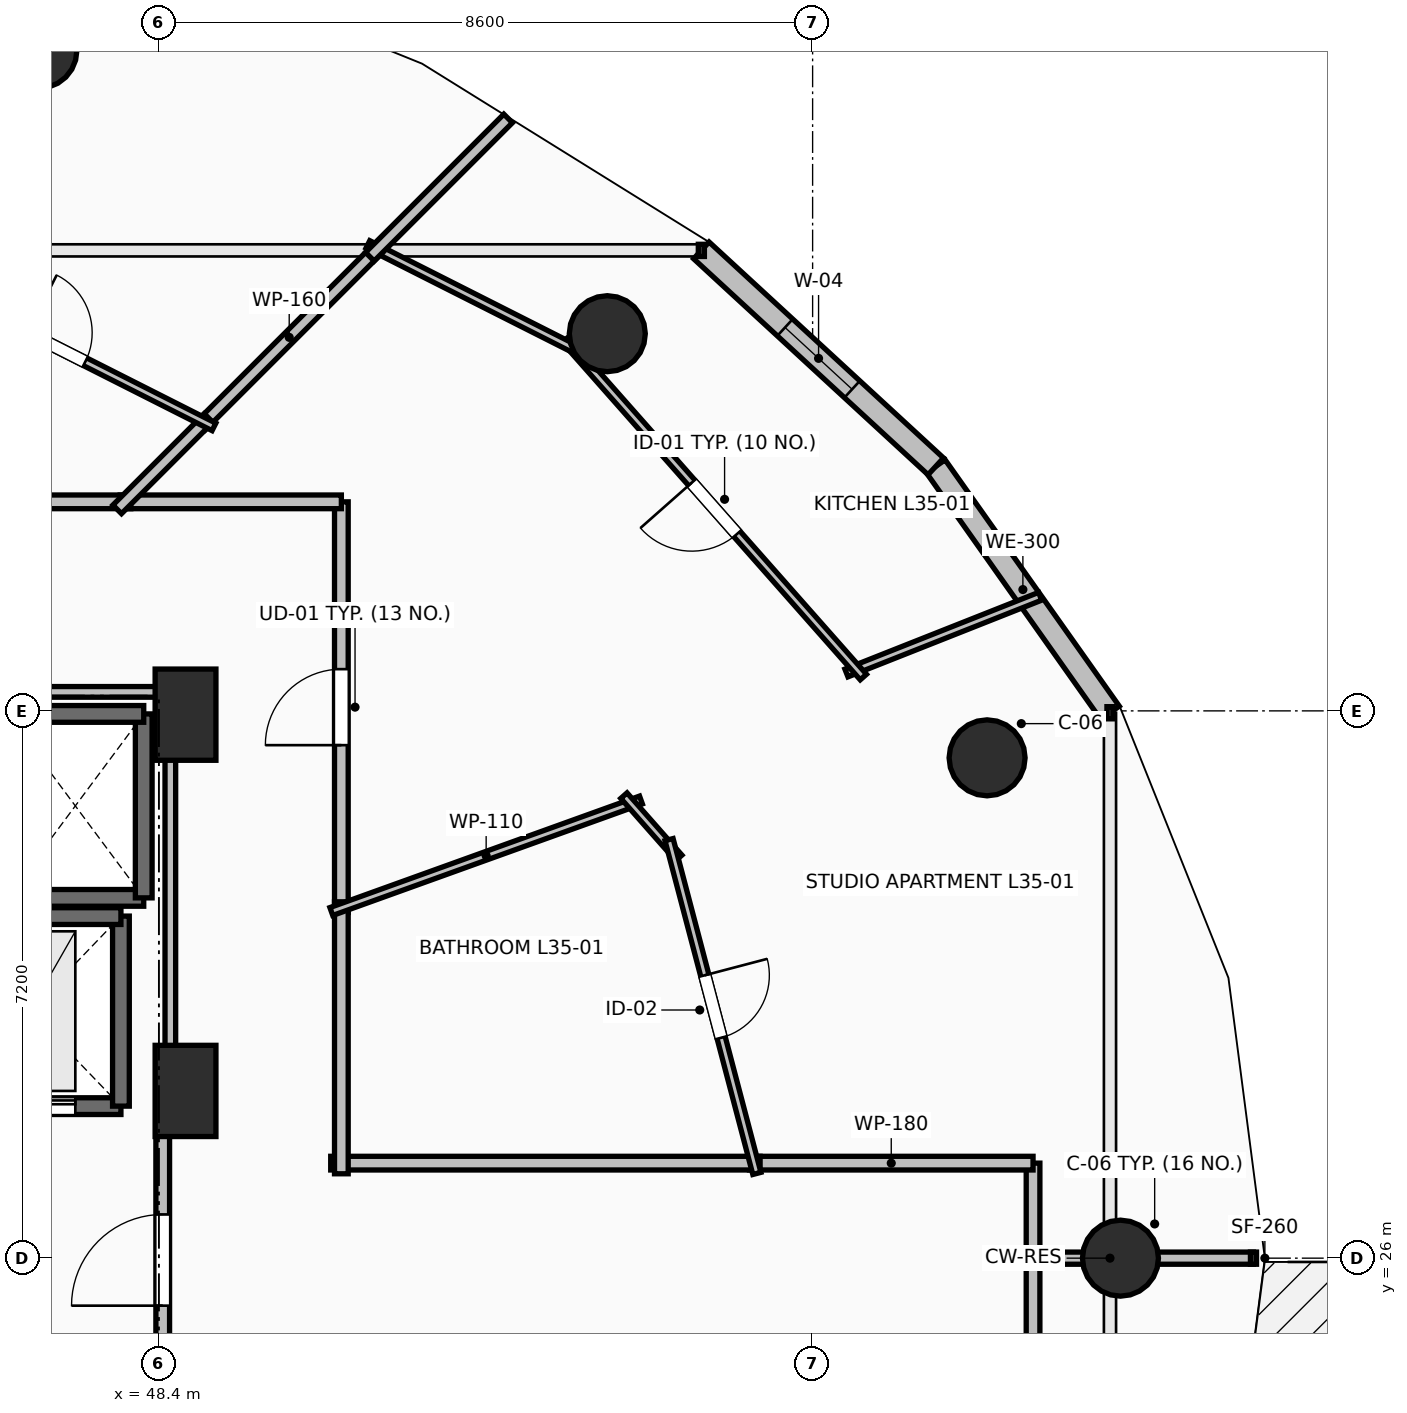
"""IFC4 building model, lengths in metres.
Left out: names, types, materials, properties, quantities, classifications, styles, units other than length and angle.
Written with IfcOpenShell. Run it as: python <this file> out.ifc"""

import sys

from ifc_helpers import new_model, si_unit, direction, frame, frame_2d, origin, origin_2d, place, context, subcontext, project, spatial, rectangle, circle, extrude, element, fill, save


model = new_model("IFC4")
c1 = context("Model", 3, precision=1e-05, world=origin(), true_north=direction((0.0, 1.0)))
c2 = subcontext(c1, "Body", "Model", "MODEL_VIEW")
j1 = project(units=[si_unit("LENGTHUNIT", "METRE"), si_unit("PLANEANGLEUNIT", "RADIAN")], contexts=[c1])
p1 = place(None, origin())
s1 = spatial("IfcSite", under=j1, at=p1, CompositionType="ELEMENT")
p2 = place(p1, origin())
s2 = spatial("IfcBuilding", under=s1, at=p2, CompositionType="ELEMENT")
p3 = place(p2, frame((0.0, 0.0, 132.6)))
s3 = spatial("IfcBuildingStorey", under=s2, at=p3, CompositionType="ELEMENT", Elevation=132.6)
for number, where, z_axis, x_axis in (
    (1, (61.05, 26.0, 0.0), (0.0, 0.0, 1.0), (1.0, 0.0, 0.0)),
    (2, (59.295, 32.582, 0.0), (0.0, 0.0, 1.0), (0.924, 0.383, 0.0)),
    (3, (54.299, 38.162, 0.0), (0.0, 0.0, 1.0), (0.707, 0.707, 0.0)),
    (4, (46.821, 41.891, 0.0), (0.0, 0.0, 1.0), (0.383, 0.924, 0.0)),
):
    element("IfcColumn", number, at=place(p3, frame(where, z_axis=z_axis, x_axis=x_axis)), inside=s3, PredefinedType="COLUMN", context=c2, shape_type="SweptSolid", body=[
        extrude(circle(Radius=0.5, at=origin_2d()), origin(), (0.0, 0.0, 1.0), 3.5),
    ])
for number, where, z_axis, x_axis in (
    (5, (48.75, 33.15, 0.0), (0.0, 0.0, 1.0), (1.0, 0.0, 0.0)),
    (6, (48.75, 28.2, 0.0), (0.0, 0.0, 1.0), (1.0, 0.0, 0.0)),
):
    element("IfcColumn", number, at=place(p3, frame(where, z_axis=z_axis, x_axis=x_axis)), inside=s3, PredefinedType="PILASTER", context=c2, shape_type="SweptSolid", body=[
        extrude(rectangle(XDim=0.8, YDim=1.2, at=origin_2d()), origin(), (0.0, 0.0, 1.0), 3.5),
    ])
p4 = place(p3, frame((60.912, 33.175, 0.0), z_axis=(0.0, 0.0, 1.0), x_axis=(-0.577269753207, 0.816553508371, 0.0)))
e7 = element("IfcWall", 7, at=p4, inside=s3, PredefinedType="STANDARD", context=c2, shape_type="SweptSolid", body=[
    extrude(rectangle(XDim=3.97, YDim=0.3, at=frame_2d((1.985, 0.0))), origin(), (0.0, 0.0, 1.0), 3.24),
])
p5 = place(p3, frame((58.62, 36.417, 0.0), z_axis=(0.0, 0.0, 1.0), x_axis=(-0.735477154165, 0.677549522693, 0.0)))
e8 = element("IfcWall", 8, at=p5, inside=s3, PredefinedType="STANDARD", context=c2, shape_type="SweptSolid", body=[
    extrude(rectangle(XDim=4.194, YDim=0.3, at=frame_2d((2.097, 0.0))), origin(), (0.0, 0.0, 1.0), 3.24),
])
p6 = place(p5, frame((1.497, 0.0, 0.85)))
e9 = element("IfcOpeningElement", 9, at=p6, cuts=e8, PredefinedType="OPENING", context=c2, shape_type="SweptSolid", body=[
    extrude(rectangle(XDim=1.2, YDim=2.1, at=frame_2d((0.6, 1.05))), frame((0.0, 0.165, 0.0), z_axis=(0.0, -1.0, 0.0), x_axis=(1.0, 0.0, 0.0)), (0.0, 0.0, 1.0), 0.33),
])
p7 = place(p3, frame((46.4, 30.74, 0.0), z_axis=(0.0, 0.0, 1.0), x_axis=(1.0, 0.0, 0.0)))
e10 = element("IfcWall", 10, at=p7, inside=s3, PredefinedType="SOLIDWALL", context=c2, shape_type="SweptSolid", body=[
    extrude(rectangle(XDim=1.8, YDim=0.22, at=frame_2d((0.9, 0.0))), origin(), (0.0, 0.0, 1.0), 3.24),
])
p8 = place(p3, frame((48.2, 30.74, 0.0), z_axis=(0.0, 0.0, 1.0), x_axis=(0.0, 1.0, 0.0)))
e11 = element("IfcWall", 11, at=p8, inside=s3, PredefinedType="SOLIDWALL", context=c2, shape_type="SweptSolid", body=[
    extrude(rectangle(XDim=2.42, YDim=0.22, at=frame_2d((1.21, 0.0))), origin(), (0.0, 0.0, 1.0), 3.24),
])
p9 = place(p3, frame((48.2, 33.16, 0.0), z_axis=(0.0, 0.0, 1.0), x_axis=(-1.0, 0.0, 0.0)))
e12 = element("IfcWall", 12, at=p9, inside=s3, PredefinedType="SOLIDWALL", context=c2, shape_type="SweptSolid", body=[
    extrude(rectangle(XDim=1.8, YDim=0.22, at=frame_2d((0.9, 0.0))), origin(), (0.0, 0.0, 1.0), 3.24),
])
p10 = place(p3, frame((45.5, 28.0, 0.0), z_axis=(0.0, 0.0, 1.0), x_axis=(1.0, 0.0, 0.0)))
e13 = element("IfcWall", 13, at=p10, inside=s3, PredefinedType="SHEAR", context=c2, shape_type="SweptSolid", body=[
    extrude(rectangle(XDim=2.4, YDim=0.22, at=frame_2d((1.2, 0.0))), origin(), (0.0, 0.0, 1.0), 3.24),
])
p11 = place(p10, frame((0.6, 0.0, 0.0)))
e14 = element("IfcOpeningElement", 14, at=p11, cuts=e13, PredefinedType="OPENING", context=c2, shape_type="SweptSolid", body=[
    extrude(rectangle(XDim=1.2, YDim=2.2, at=frame_2d((0.6, 1.1))), frame((0.0, 0.125, 0.0), z_axis=(0.0, -1.0, 0.0), x_axis=(1.0, 0.0, 0.0)), (0.0, 0.0, 1.0), 0.25),
])
p12 = place(p3, frame((47.9, 28.0, 0.0), z_axis=(0.0, 0.0, 1.0), x_axis=(0.0, 1.0, 0.0)))
e15 = element("IfcWall", 15, at=p12, inside=s3, PredefinedType="SHEAR", context=c2, shape_type="SweptSolid", body=[
    extrude(rectangle(XDim=2.5, YDim=0.22, at=frame_2d((1.25, 0.0))), origin(), (0.0, 0.0, 1.0), 3.24),
])
p13 = place(p3, frame((47.9, 30.5, 0.0), z_axis=(0.0, 0.0, 1.0), x_axis=(-1.0, 0.0, 0.0)))
e16 = element("IfcWall", 16, at=p13, inside=s3, PredefinedType="SHEAR", context=c2, shape_type="SweptSolid", body=[
    extrude(rectangle(XDim=2.4, YDim=0.22, at=frame_2d((1.2, 0.0))), origin(), (0.0, 0.0, 1.0), 3.24),
])
p14 = place(p3, frame((48.45, 23.95, 0.0), z_axis=(0.0, 0.0, 1.0), x_axis=(0.0, 1.0, 0.0)))
e17 = element("IfcWall", 17, at=p14, inside=s3, PredefinedType="PARTITIONING", context=c2, shape_type="SweptSolid", body=[
    extrude(rectangle(XDim=4.05, YDim=0.18, at=frame_2d((2.025, 0.0))), origin(), (0.0, 0.0, 1.0), 3.24),
])
p15 = place(p14, frame((1.425, 0.0, 0.0)))
e18 = element("IfcOpeningElement", 18, at=p15, cuts=e17, PredefinedType="OPENING", context=c2, shape_type="SweptSolid", body=[
    extrude(rectangle(XDim=1.2, YDim=2.15, at=frame_2d((0.6, 1.075))), frame((0.0, 0.105, 0.0), z_axis=(0.0, -1.0, 0.0), x_axis=(1.0, 0.0, 0.0)), (0.0, 0.0, 1.0), 0.21),
])
p16 = place(p3, frame((59.9, 25.94, 0.0), z_axis=(0.0, 0.0, 1.0), x_axis=(0.0, 1.0, 0.0)))
e19 = element("IfcWall", 19, at=p16, inside=s3, PredefinedType="PARTITIONING", context=c2, shape_type="SweptSolid", body=[
    extrude(rectangle(XDim=1.31, YDim=0.18, at=frame_2d((0.655, 0.0))), origin(), (0.0, 0.0, 1.0), 2.432),
])
p17 = place(p3, frame((59.9, 27.25, 0.0), z_axis=(0.0, 0.0, 1.0), x_axis=(-1.0, 0.0, 0.0)))
e20 = element("IfcWall", 20, at=p17, inside=s3, PredefinedType="PARTITIONING", context=c2, shape_type="SweptSolid", body=[
    extrude(rectangle(XDim=3.731, YDim=0.18, at=frame_2d((1.865, 0.0))), origin(), (0.0, 0.0, 1.0), 2.874),
])
p18 = place(p3, frame((50.8, 30.548, 0.0), z_axis=(0.0, 0.0, 1.0), x_axis=(0.0, 1.0, 0.0)))
e21 = element("IfcWall", 21, at=p18, inside=s3, PredefinedType="PARTITIONING", context=c2, shape_type="SweptSolid", body=[
    extrude(rectangle(XDim=5.402, YDim=0.18, at=frame_2d((2.701, 0.0))), origin(), (0.0, 0.0, 1.0), 2.432),
])
p19 = place(p18, frame((2.201, 0.0, 0.0)))
e22 = element("IfcOpeningElement", 22, at=p19, cuts=e21, PredefinedType="OPENING", context=c2, shape_type="SweptSolid", body=[
    extrude(rectangle(XDim=1.0, YDim=2.15, at=frame_2d((0.5, 1.075))), frame((0.0, 0.105, 0.0), z_axis=(0.0, -1.0, 0.0), x_axis=(1.0, 0.0, 0.0)), (0.0, 0.0, 1.0), 0.21),
])
p20 = place(p3, frame((50.8, 35.95, 0.0), z_axis=(0.0, 0.0, 1.0), x_axis=(-1.0, 0.0, 0.0)))
e23 = element("IfcWall", 23, at=p20, inside=s3, PredefinedType="PARTITIONING", context=c2, shape_type="SweptSolid", body=[
    extrude(rectangle(XDim=2.91, YDim=0.18, at=frame_2d((1.455, 0.0))), origin(), (0.0, 0.0, 1.0), 2.432),
])
p21 = place(p3, frame((56.309, 27.25, 0.0), z_axis=(0.0, 0.0, 1.0), x_axis=(-1.0, 0.0, 0.0)))
e24 = element("IfcWall", 24, at=p21, inside=s3, PredefinedType="PARTITIONING", context=c2, shape_type="SweptSolid", body=[
    extrude(rectangle(XDim=5.649, YDim=0.18, at=frame_2d((2.825, 0.0))), origin(), (0.0, 0.0, 1.0), 2.432),
])
p22 = place(p3, frame((50.8, 27.11, 0.0), z_axis=(0.0, 0.0, 1.0), x_axis=(0.0, 1.0, 0.0)))
e25 = element("IfcWall", 25, at=p22, inside=s3, PredefinedType="PARTITIONING", context=c2, shape_type="SweptSolid", body=[
    extrude(rectangle(XDim=3.578, YDim=0.18, at=frame_2d((1.789, 0.0))), origin(), (0.0, 0.0, 1.0), 2.432),
])
p23 = place(p3, frame((48.03, 35.95, 0.0), z_axis=(0.0, 0.0, 1.0), x_axis=(-1.0, 0.0, 0.0)))
e26 = element("IfcWall", 26, at=p23, inside=s3, PredefinedType="PARTITIONING", context=c2, shape_type="SweptSolid", body=[
    extrude(rectangle(XDim=5.422, YDim=0.18, at=frame_2d((2.711, 0.0))), origin(), (0.0, 0.0, 1.0), 2.432),
])
p24 = place(p3, frame((59.9, 24.55, 0.0), z_axis=(0.0, 0.0, 1.0), x_axis=(0.0, 1.0, 0.0)))
e27 = element("IfcWall", 27, at=p24, inside=s3, PredefinedType="PARTITIONING", context=c2, shape_type="SweptSolid", body=[
    extrude(rectangle(XDim=1.39, YDim=0.18, at=frame_2d((0.695, 0.0))), origin(), (0.0, 0.0, 1.0), 2.432),
])
p25 = place(p3, frame((50.668, 30.561, 0.0), z_axis=(0.0, 0.0, 1.0), x_axis=(0.94086224956, 0.33878935543, 0.0)))
e28 = element("IfcWall", 28, at=p25, inside=s3, PredefinedType="PARTITIONING", context=c2, shape_type="SweptSolid", body=[
    extrude(rectangle(XDim=4.33, YDim=0.11, at=frame_2d((2.165, 0.0))), origin(), (0.0, 0.0, 1.0), 2.922),
])
p26 = place(p3, frame((54.517, 32.085, 0.0), z_axis=(0.0, 0.0, 1.0), x_axis=(0.661444121134, -0.749994449724, 0.0)))
e29 = element("IfcWall", 29, at=p26, inside=s3, PredefinedType="PARTITIONING", context=c2, shape_type="SweptSolid", body=[
    extrude(rectangle(XDim=1.092, YDim=0.11, at=frame_2d((0.546, 0.0))), origin(), (0.0, 0.0, 1.0), 3.24),
])
p27 = place(p3, frame((55.111, 31.506, 0.0), z_axis=(0.0, 0.0, 1.0), x_axis=(0.254395386743, -0.96710029842, 0.0)))
e30 = element("IfcWall", 30, at=p27, inside=s3, PredefinedType="PARTITIONING", context=c2, shape_type="SweptSolid", body=[
    extrude(rectangle(XDim=4.541, YDim=0.11, at=frame_2d((2.271, 0.0))), origin(), (0.0, 0.0, 1.0), 2.432),
])
p28 = place(p27, frame((1.846, 0.0, 0.0)))
e31 = element("IfcOpeningElement", 31, at=p28, cuts=e30, PredefinedType="OPENING", context=c2, shape_type="SweptSolid", body=[
    extrude(rectangle(XDim=0.85, YDim=2.1, at=frame_2d((0.425, 1.05))), frame((0.0, 0.07, 0.0), z_axis=(0.0, -1.0, 0.0), x_axis=(1.0, 0.0, 0.0)), (0.0, 0.0, 1.0), 0.14),
])
p29 = place(p3, frame((59.993, 34.708, 0.0), z_axis=(0.0, 0.0, 1.0), x_axis=(-0.92976723416, -0.368147919025, 0.0)))
e32 = element("IfcWall", 32, at=p29, inside=s3, PredefinedType="PARTITIONING", context=c2, shape_type="SweptSolid", body=[
    extrude(rectangle(XDim=2.741, YDim=0.11, at=frame_2d((1.37, 0.0))), origin(), (0.0, 0.0, 1.0), 2.728),
])
p30 = place(p3, frame((57.668, 33.645, 0.0), z_axis=(0.0, 0.0, 1.0), x_axis=(-0.66214504072, 0.749375703536, 0.0)))
e33 = element("IfcWall", 33, at=p30, inside=s3, PredefinedType="PARTITIONING", context=c2, shape_type="SweptSolid", body=[
    extrude(rectangle(XDim=5.922, YDim=0.11, at=frame_2d((2.961, 0.0))), origin(), (0.0, 0.0, 1.0), 2.432),
])
p31 = place(p30, frame((2.511, 0.0, 0.0)))
e34 = element("IfcOpeningElement", 34, at=p31, cuts=e33, PredefinedType="OPENING", context=c2, shape_type="SweptSolid", body=[
    extrude(rectangle(XDim=0.9, YDim=2.1, at=frame_2d((0.45, 1.05))), frame((0.0, 0.07, 0.0), z_axis=(0.0, -1.0, 0.0), x_axis=(1.0, 0.0, 0.0)), (0.0, 0.0, 1.0), 0.14),
])
p32 = place(p3, frame((53.964, 37.915, 0.0), z_axis=(0.0, 0.0, 1.0), x_axis=(-0.892546166909, 0.450956028828, 0.0)))
e35 = element("IfcWall", 35, at=p32, inside=s3, PredefinedType="PARTITIONING", context=c2, shape_type="SweptSolid", body=[
    extrude(rectangle(XDim=3.154, YDim=0.11, at=frame_2d((1.577, 0.0))), origin(), (0.0, 0.0, 1.0), 2.432),
])
p33 = place(p3, frame((51.274, 39.274, 0.0), z_axis=(0.0, 0.0, 1.0), x_axis=(-0.707106781187, -0.707106781187, 0.0)))
e36 = element("IfcWall", 36, at=p33, inside=s3, PredefinedType="PARTITIONING", context=c2, shape_type="SweptSolid", body=[
    extrude(rectangle(XDim=3.281, YDim=0.16, at=frame_2d((1.64, 0.0))), origin(), (0.0, 0.0, 1.0), 2.874),
])
p34 = place(p3, frame((49.053, 37.053, 0.0), z_axis=(0.0, 0.0, 1.0), x_axis=(-0.707106781187, -0.707106781187, 0.0)))
e37 = element("IfcWall", 37, at=p34, inside=s3, PredefinedType="PARTITIONING", context=c2, shape_type="SweptSolid", body=[
    extrude(rectangle(XDim=1.7, YDim=0.16, at=frame_2d((0.85, 0.0))), origin(), (0.0, 0.0, 1.0), 2.432),
])
p35 = place(p3, frame((59.9, 26.0, 0.0), z_axis=(0.0, 0.0, 1.0), x_axis=(1.0, 0.0, 0.0)))
e38 = element("IfcWall", 38, at=p35, inside=s3, PredefinedType="PARTITIONING", context=c2, shape_type="SweptSolid", body=[
    extrude(rectangle(XDim=2.899, YDim=0.16, at=frame_2d((1.45, 0.0))), origin(), (0.0, 0.0, 1.0), 2.432),
])
p36 = place(p3, frame((52.994, 40.994, 0.0), z_axis=(0.0, 0.0, 1.0), x_axis=(-0.707106781187, -0.707106781187, 0.0)))
e39 = element("IfcWall", 39, at=p36, inside=s3, PredefinedType="PARTITIONING", context=c2, shape_type="SweptSolid", body=[
    extrude(rectangle(XDim=2.572, YDim=0.16, at=frame_2d((1.286, 0.0))), origin(), (0.0, 0.0, 1.0), 2.728),
])
p37 = place(p3, frame((44.978, 39.031, 0.0), z_axis=(0.0, 0.0, 1.0), x_axis=(0.892495276856, -0.451056737882, 0.0)))
e40 = element("IfcWall", 40, at=p37, inside=s3, PredefinedType="PARTITIONING", context=c2, shape_type="SweptSolid", body=[
    extrude(rectangle(XDim=4.645, YDim=0.11, at=frame_2d((2.323, 0.0))), origin(), (0.0, 0.0, 1.0), 2.432),
])
p38 = place(p37, frame((1.898, 0.0, 0.0)))
e41 = element("IfcOpeningElement", 41, at=p38, cuts=e40, PredefinedType="OPENING", context=c2, shape_type="SweptSolid", body=[
    extrude(rectangle(XDim=0.85, YDim=2.1, at=frame_2d((0.425, 1.05))), frame((0.0, 0.07, 0.0), z_axis=(0.0, -1.0, 0.0), x_axis=(1.0, 0.0, 0.0)), (0.0, 0.0, 1.0), 0.14),
])
p39 = place(p3, frame((48.55, 28.196, 0.0), z_axis=(0.0, 0.0, 1.0), x_axis=(0.0, 1.0, 0.0)))
e42 = element("IfcWall", 42, at=p39, inside=s3, PredefinedType="PARTITIONING", context=c2, shape_type="SweptSolid", body=[
    extrude(rectangle(XDim=5.254, YDim=0.14, at=frame_2d((2.627, 0.0))), origin(), (0.0, 0.0, 1.0), 2.432),
])
p40 = place(p3, frame((48.55, 33.45, 0.0), z_axis=(0.0, 0.0, 1.0), x_axis=(-1.0, 0.0, 0.0)))
e43 = element("IfcWall", 43, at=p40, inside=s3, PredefinedType="PARTITIONING", context=c2, shape_type="SweptSolid", body=[
    extrude(rectangle(XDim=4.21, YDim=0.14, at=frame_2d((2.105, 0.0))), origin(), (0.0, 0.0, 1.0), 2.432),
])
p41 = place(p6, origin())
e44 = element("IfcWindow", 44, at=p41, inside=s3, PartitioningType="SINGLE_PANEL", PredefinedType="WINDOW", context=c2, shape_type="SweptSolid", body=[
    extrude(rectangle(XDim=1.2, YDim=2.1, at=frame_2d((0.6, 1.05))), frame((0.0, 0.03, 0.0), z_axis=(0.0, -1.0, 0.0), x_axis=(1.0, 0.0, 0.0)), (0.0, 0.0, 1.0), 0.06),
])
fill(e9, e44)
p42 = place(p11, origin())
e45 = element("IfcDoor", 45, at=p42, inside=s3, OperationType="SLIDING_TO_LEFT", PredefinedType="DOOR", context=c2, shape_type="SweptSolid", body=[
    extrude(rectangle(XDim=1.2, YDim=2.2, at=frame_2d((0.6, 1.1))), frame((0.0, 0.025, 0.0), z_axis=(0.0, -1.0, 0.0), x_axis=(1.0, 0.0, 0.0)), (0.0, 0.0, 1.0), 0.05),
])
fill(e14, e45)
p43 = place(p15, origin())
e46 = element("IfcDoor", 46, at=p43, inside=s3, OperationType="SINGLE_SWING_LEFT", PredefinedType="DOOR", context=c2, shape_type="SweptSolid", body=[
    extrude(rectangle(XDim=1.2, YDim=2.15, at=frame_2d((0.6, 1.075))), frame((0.0, 0.025, 0.0), z_axis=(0.0, -1.0, 0.0), x_axis=(1.0, 0.0, 0.0)), (0.0, 0.0, 1.0), 0.05),
])
fill(e18, e46)
p44 = place(p19, origin())
e47 = element("IfcDoor", 47, at=p44, inside=s3, OperationType="SINGLE_SWING_LEFT", PredefinedType="DOOR", context=c2, shape_type="SweptSolid", body=[
    extrude(rectangle(XDim=1.0, YDim=2.15, at=frame_2d((0.5, 1.075))), frame((0.0, 0.025, 0.0), z_axis=(0.0, -1.0, 0.0), x_axis=(1.0, 0.0, 0.0)), (0.0, 0.0, 1.0), 0.05),
])
fill(e22, e47)
p45 = place(p28, origin())
e48 = element("IfcDoor", 48, at=p45, inside=s3, OperationType="SINGLE_SWING_LEFT", PredefinedType="DOOR", context=c2, shape_type="SweptSolid", body=[
    extrude(rectangle(XDim=0.85, YDim=2.1, at=frame_2d((0.425, 1.05))), frame((0.0, 0.025, 0.0), z_axis=(0.0, -1.0, 0.0), x_axis=(1.0, 0.0, 0.0)), (0.0, 0.0, 1.0), 0.05),
])
fill(e31, e48)
p46 = place(p31, origin())
e49 = element("IfcDoor", 49, at=p46, inside=s3, OperationType="SINGLE_SWING_RIGHT", PredefinedType="DOOR", context=c2, shape_type="SweptSolid", body=[
    extrude(rectangle(XDim=0.9, YDim=2.1, at=frame_2d((0.45, 1.05))), frame((0.0, 0.025, 0.0), z_axis=(0.0, -1.0, 0.0), x_axis=(1.0, 0.0, 0.0)), (0.0, 0.0, 1.0), 0.05),
])
fill(e34, e49)
p47 = place(p38, origin())
e50 = element("IfcDoor", 50, at=p47, inside=s3, OperationType="SINGLE_SWING_LEFT", PredefinedType="DOOR", context=c2, shape_type="SweptSolid", body=[
    extrude(rectangle(XDim=0.85, YDim=2.1, at=frame_2d((0.425, 1.05))), frame((0.0, 0.025, 0.0), z_axis=(0.0, -1.0, 0.0), x_axis=(1.0, 0.0, 0.0)), (0.0, 0.0, 1.0), 0.05),
])
fill(e41, e50)
save(model, sys.argv[1])
